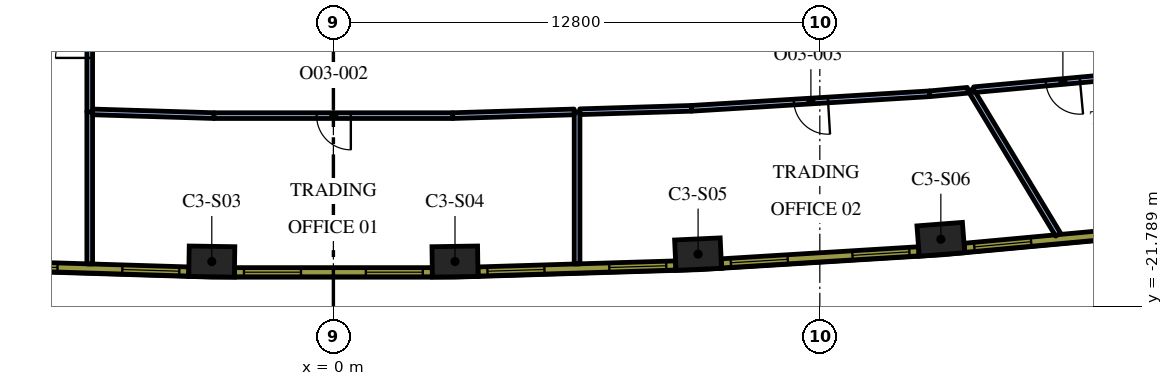
"""IFC4 building model, lengths in metres.
Left out: names, types, materials, properties, quantities, classifications, styles, units other than length and angle.
Written with IfcOpenShell. Run it as: python <this file> out.ifc"""

import sys

from ifc_helpers import new_model, si_unit, direction, frame, frame_2d, origin, origin_2d, place, context, subcontext, project, spatial, rectangle, extrude, element, fill, save


model = new_model("IFC4")
c1 = context("Model", 3, precision=1e-05, world=origin(), true_north=direction((0.0, 1.0)))
c2 = subcontext(c1, "Body", "Model", "MODEL_VIEW")
j1 = project(units=[si_unit("LENGTHUNIT", "METRE"), si_unit("PLANEANGLEUNIT", "RADIAN")], contexts=[c1])
p1 = place(None, origin())
s1 = spatial("IfcSite", under=j1, at=p1, CompositionType="ELEMENT")
p2 = place(p1, origin())
s2 = spatial("IfcBuilding", under=s1, at=p2, CompositionType="ELEMENT")
p3 = place(p2, frame((0.0, 0.0, 171.0)))
s3 = spatial("IfcBuildingStorey", under=s2, at=p3, CompositionType="ELEMENT", Elevation=171.0)
for number, where, z_axis, x_axis in (
    (1, (-3.2, -20.608, 0.0), (0.0, 0.0, 1.0), (1.0, -0.015, 0.0)),
    (2, (3.2, -20.608, 0.0), (0.0, 0.0, 1.0), (1.0, 0.015, 0.0)),
    (3, (9.597, -20.413, 0.0), (0.0, 0.0, 1.0), (0.999, 0.046, 0.0)),
    (4, (15.985, -20.022, 0.0), (0.0, 0.0, 1.0), (0.997, 0.076, 0.0)),
):
    element("IfcColumn", number, at=place(p3, frame(where, z_axis=z_axis, x_axis=x_axis)), inside=s3, PredefinedType="COLUMN", context=c2, shape_type="SweptSolid", body=[
        extrude(rectangle(XDim=1.2, YDim=0.8, at=origin_2d()), origin(), (0.0, 0.0, 1.0), 4.2),
    ])
p4 = place(p3, frame((-6.412, -16.664, 0.0), z_axis=(0.0, 0.0, 1.0), x_axis=(0.0, -1.0, 0.0)))
e5 = element("IfcWall", 5, at=p4, inside=s3, PredefinedType="PARTITIONING", context=c2, shape_type="SweptSolid", body=[
    extrude(rectangle(XDim=4.006, YDim=0.15, at=frame_2d((2.003, 0.0))), origin(), (0.0, 0.0, 1.0), 3.15),
])
p5 = place(p3, frame((-6.412, -16.672, 0.0), z_axis=(0.0, 0.0, 1.0), x_axis=(0.0, 1.0, 0.0)))
e6 = element("IfcWall", 6, at=p5, inside=s3, PredefinedType="PARTITIONING", context=c2, shape_type="SweptSolid", body=[
    extrude(rectangle(XDim=3.822, YDim=0.15, at=frame_2d((1.911, 0.0))), origin(), (0.0, 0.0, 1.0), 3.15),
])
p6 = place(p5, frame((1.422, 0.0, 0.0)))
e7 = element("IfcOpeningElement", 7, at=p6, cuts=e6, PredefinedType="OPENING", context=c2, shape_type="SweptSolid", body=[
    extrude(rectangle(XDim=0.9, YDim=2.1, at=frame_2d((0.45, 1.05))), frame((0.0, 0.085, 0.0), z_axis=(0.0, -1.0, 0.0), x_axis=(1.0, 0.0, 0.0)), (0.0, 0.0, 1.0), 0.17),
])
p7 = place(p3, frame((6.412, -16.668, 0.0), z_axis=(0.0, 0.0, 1.0), x_axis=(0.0, -1.0, 0.0)))
e8 = element("IfcWall", 8, at=p7, inside=s3, PredefinedType="PARTITIONING", context=c2, shape_type="SweptSolid", body=[
    extrude(rectangle(XDim=4.002, YDim=0.15, at=frame_2d((2.001, 0.0))), origin(), (0.0, 0.0, 1.0), 3.15),
])
p8 = place(p3, frame((-6.337, -16.671, 0.0), z_axis=(0.0, 0.0, 1.0), x_axis=(0.999533369646, -0.030545751995, 0.0)))
e9 = element("IfcWall", 9, at=p8, inside=s3, PredefinedType="PARTITIONING", context=c2, shape_type="SweptSolid", body=[
    extrude(rectangle(XDim=3.197, YDim=0.15, at=frame_2d((1.599, 0.0))), origin(), (0.0, 0.0, 1.0), 3.15),
])
p9 = place(p3, frame((3.141, -16.768, 0.0), z_axis=(0.0, 0.0, 1.0), x_axis=(-1.0, 0.0, 0.0)))
e10 = element("IfcWall", 10, at=p9, inside=s3, PredefinedType="PARTITIONING", context=c2, shape_type="SweptSolid", body=[
    extrude(rectangle(XDim=6.283, YDim=0.15, at=frame_2d((3.141, 0.0))), origin(), (0.0, 0.0, 1.0), 3.15),
])
p10 = place(p9, frame((2.683, 0.0, 0.0)))
e11 = element("IfcOpeningElement", 11, at=p10, cuts=e10, PredefinedType="OPENING", context=c2, shape_type="SweptSolid", body=[
    extrude(rectangle(XDim=0.9, YDim=2.1, at=frame_2d((0.45, 1.05))), frame((0.0, 0.085, 0.0), z_axis=(0.0, -1.0, 0.0), x_axis=(1.0, 0.0, 0.0)), (0.0, 0.0, 1.0), 0.17),
])
p11 = place(p3, frame((3.141, -16.768, 0.0), z_axis=(0.0, 0.0, 1.0), x_axis=(0.999533369646, 0.030545751995, 0.0)))
e12 = element("IfcWall", 12, at=p11, inside=s3, PredefinedType="PARTITIONING", context=c2, shape_type="SweptSolid", body=[
    extrude(rectangle(XDim=3.197, YDim=0.15, at=frame_2d((1.599, 0.0))), origin(), (0.0, 0.0, 1.0), 3.15),
])
p12 = place(p3, frame((16.773, -16.094, 0.0), z_axis=(0.0, 0.0, 1.0), x_axis=(0.516844039178, -0.856079575253, 0.0)))
e13 = element("IfcWall", 13, at=p12, inside=s3, PredefinedType="PARTITIONING", context=c2, shape_type="SweptSolid", body=[
    extrude(rectangle(XDim=4.446, YDim=0.15, at=frame_2d((2.223, 0.0))), origin(), (0.0, 0.0, 1.0), 3.15),
])
p13 = place(p3, frame((6.487, -16.666, 0.0), z_axis=(0.0, 0.0, 1.0), x_axis=(0.999533978083, 0.030525835896, 0.0)))
e14 = element("IfcWall", 14, at=p13, inside=s3, PredefinedType="PARTITIONING", context=c2, shape_type="SweptSolid", body=[
    extrude(rectangle(XDim=2.935, YDim=0.15, at=frame_2d((1.468, 0.0))), origin(), (0.0, 0.0, 1.0), 3.15),
])
p14 = place(p3, frame((15.692, -16.193, 0.0), z_axis=(0.0, 0.0, 1.0), x_axis=(-0.998137075468, -0.061011298754, 0.0)))
e15 = element("IfcWall", 15, at=p14, inside=s3, PredefinedType="PARTITIONING", context=c2, shape_type="SweptSolid", body=[
    extrude(rectangle(XDim=6.282, YDim=0.15, at=frame_2d((3.141, 0.0))), origin(), (0.0, 0.0, 1.0), 3.15),
])
p15 = place(p14, frame((2.683, 0.0, 0.0)))
e16 = element("IfcOpeningElement", 16, at=p15, cuts=e15, PredefinedType="OPENING", context=c2, shape_type="SweptSolid", body=[
    extrude(rectangle(XDim=0.9, YDim=2.1, at=frame_2d((0.45, 1.05))), frame((0.0, 0.085, 0.0), z_axis=(0.0, -1.0, 0.0), x_axis=(1.0, 0.0, 0.0)), (0.0, 0.0, 1.0), 0.17),
])
p16 = place(p3, frame((15.692, -16.193, 0.0), z_axis=(0.0, 0.0, 1.0), x_axis=(0.995818997537, 0.091348366946, 0.0)))
e17 = element("IfcWall", 17, at=p16, inside=s3, PredefinedType="PARTITIONING", context=c2, shape_type="SweptSolid", body=[
    extrude(rectangle(XDim=1.002, YDim=0.15, at=frame_2d((0.501, 0.0))), origin(), (0.0, 0.0, 1.0), 3.15),
])
p17 = place(p3, frame((21.525, -15.657, 0.0), z_axis=(0.0, 0.0, 1.0), x_axis=(-0.99581172086, -0.091427657734, 0.0)))
e18 = element("IfcWall", 18, at=p17, inside=s3, PredefinedType="PARTITIONING", context=c2, shape_type="SweptSolid", body=[
    extrude(rectangle(XDim=4.689, YDim=0.15, at=frame_2d((2.344, 0.0))), origin(), (0.0, 0.0, 1.0), 3.15),
])
p18 = place(p17, frame((1.889, 0.0, 0.0)))
e19 = element("IfcOpeningElement", 19, at=p18, cuts=e18, PredefinedType="OPENING", context=c2, shape_type="SweptSolid", body=[
    extrude(rectangle(XDim=0.9, YDim=2.1, at=frame_2d((0.45, 1.05))), frame((0.0, 0.085, 0.0), z_axis=(0.0, -1.0, 0.0), x_axis=(1.0, 0.0, 0.0)), (0.0, 0.0, 1.0), 0.17),
])
p19 = place(p3, frame((-9.007, -20.711, 0.0), z_axis=(0.0, 0.0, 1.0), x_axis=(0.999533441983, -0.030543384845, 0.0)))
e20 = element("IfcWall", 20, at=p19, inside=s3, PredefinedType="SOLIDWALL", context=c2, shape_type="SweptSolid", body=[
    extrude(rectangle(XDim=5.204, YDim=0.24, at=frame_2d((2.602, 0.0))), origin(), (0.0, 0.0, 1.0), 3.95),
])
p20 = place(p19, frame((0.248, 0.0, 0.9)))
e21 = element("IfcOpeningElement", 21, at=p20, cuts=e20, PredefinedType="OPENING", context=c2, shape_type="SweptSolid", body=[
    extrude(rectangle(XDim=1.5, YDim=2.55, at=frame_2d((0.75, 1.275))), frame((0.0, 0.13, 0.0), z_axis=(0.0, -1.0, 0.0), x_axis=(1.0, 0.0, 0.0)), (0.0, 0.0, 1.0), 0.26),
])
p21 = place(p19, frame((3.455, 0.0, 0.9)))
e22 = element("IfcOpeningElement", 22, at=p21, cuts=e20, PredefinedType="OPENING", context=c2, shape_type="SweptSolid", body=[
    extrude(rectangle(XDim=1.5, YDim=2.55, at=frame_2d((0.75, 1.275))), frame((0.0, 0.13, 0.0), z_axis=(0.0, -1.0, 0.0), x_axis=(1.0, 0.0, 0.0)), (0.0, 0.0, 1.0), 0.26),
])
p22 = place(p3, frame((-2.602, -20.888, 0.0), z_axis=(0.0, 0.0, 1.0), x_axis=(1.0, 0.0, 0.0)))
e23 = element("IfcWall", 23, at=p22, inside=s3, PredefinedType="SOLIDWALL", context=c2, shape_type="SweptSolid", body=[
    extrude(rectangle(XDim=5.204, YDim=0.24, at=frame_2d((2.602, 0.0))), origin(), (0.0, 0.0, 1.0), 3.95),
])
p23 = place(p22, frame((0.248, 0.0, 0.9)))
e24 = element("IfcOpeningElement", 24, at=p23, cuts=e23, PredefinedType="OPENING", context=c2, shape_type="SweptSolid", body=[
    extrude(rectangle(XDim=1.5, YDim=2.55, at=frame_2d((0.75, 1.275))), frame((0.0, 0.13, 0.0), z_axis=(0.0, -1.0, 0.0), x_axis=(1.0, 0.0, 0.0)), (0.0, 0.0, 1.0), 0.26),
])
p24 = place(p22, frame((3.455, 0.0, 0.9)))
e25 = element("IfcOpeningElement", 25, at=p24, cuts=e23, PredefinedType="OPENING", context=c2, shape_type="SweptSolid", body=[
    extrude(rectangle(XDim=1.5, YDim=2.55, at=frame_2d((0.75, 1.275))), frame((0.0, 0.13, 0.0), z_axis=(0.0, -1.0, 0.0), x_axis=(1.0, 0.0, 0.0)), (0.0, 0.0, 1.0), 0.26),
])
p25 = place(p3, frame((3.806, -20.87, 0.0), z_axis=(0.0, 0.0, 1.0), x_axis=(0.999533441983, 0.030543384845, 0.0)))
e26 = element("IfcWall", 26, at=p25, inside=s3, PredefinedType="SOLIDWALL", context=c2, shape_type="SweptSolid", body=[
    extrude(rectangle(XDim=5.204, YDim=0.24, at=frame_2d((2.602, 0.0))), origin(), (0.0, 0.0, 1.0), 3.95),
])
p26 = place(p25, frame((0.248, 0.0, 0.9)))
e27 = element("IfcOpeningElement", 27, at=p26, cuts=e26, PredefinedType="OPENING", context=c2, shape_type="SweptSolid", body=[
    extrude(rectangle(XDim=1.5, YDim=2.55, at=frame_2d((0.75, 1.275))), frame((0.0, 0.13, 0.0), z_axis=(0.0, -1.0, 0.0), x_axis=(1.0, 0.0, 0.0)), (0.0, 0.0, 1.0), 0.26),
])
p27 = place(p25, frame((3.455, 0.0, 0.9)))
e28 = element("IfcOpeningElement", 28, at=p27, cuts=e26, PredefinedType="OPENING", context=c2, shape_type="SweptSolid", body=[
    extrude(rectangle(XDim=1.5, YDim=2.55, at=frame_2d((0.75, 1.275))), frame((0.0, 0.13, 0.0), z_axis=(0.0, -1.0, 0.0), x_axis=(1.0, 0.0, 0.0)), (0.0, 0.0, 1.0), 0.26),
])
p28 = place(p3, frame((10.211, -20.656, 0.0), z_axis=(0.0, 0.0, 1.0), x_axis=(0.998135294646, 0.061040425794, 0.0)))
e29 = element("IfcWall", 29, at=p28, inside=s3, PredefinedType="SOLIDWALL", context=c2, shape_type="SweptSolid", body=[
    extrude(rectangle(XDim=5.204, YDim=0.24, at=frame_2d((2.602, 0.0))), origin(), (0.0, 0.0, 1.0), 3.95),
])
p29 = place(p28, frame((0.248, 0.0, 0.9)))
e30 = element("IfcOpeningElement", 30, at=p29, cuts=e29, PredefinedType="OPENING", context=c2, shape_type="SweptSolid", body=[
    extrude(rectangle(XDim=1.5, YDim=2.55, at=frame_2d((0.75, 1.275))), frame((0.0, 0.13, 0.0), z_axis=(0.0, -1.0, 0.0), x_axis=(1.0, 0.0, 0.0)), (0.0, 0.0, 1.0), 0.26),
])
p30 = place(p28, frame((3.455, 0.0, 0.9)))
e31 = element("IfcOpeningElement", 31, at=p30, cuts=e29, PredefinedType="OPENING", context=c2, shape_type="SweptSolid", body=[
    extrude(rectangle(XDim=1.5, YDim=2.55, at=frame_2d((0.75, 1.275))), frame((0.0, 0.13, 0.0), z_axis=(0.0, -1.0, 0.0), x_axis=(1.0, 0.0, 0.0)), (0.0, 0.0, 1.0), 0.26),
])
p31 = place(p3, frame((16.606, -20.247, 0.0), z_axis=(0.0, 0.0, 1.0), x_axis=(0.995808712151, 0.091460422067, 0.0)))
e32 = element("IfcWall", 32, at=p31, inside=s3, PredefinedType="SOLIDWALL", context=c2, shape_type="SweptSolid", body=[
    extrude(rectangle(XDim=5.213, YDim=0.24, at=frame_2d((2.606, 0.0))), origin(), (0.0, 0.0, 1.0), 3.95),
])
p32 = place(p31, frame((0.261, 0.0, 0.9)))
e33 = element("IfcOpeningElement", 33, at=p32, cuts=e32, PredefinedType="OPENING", context=c2, shape_type="SweptSolid", body=[
    extrude(rectangle(XDim=1.5, YDim=2.55, at=frame_2d((0.75, 1.275))), frame((0.0, 0.13, 0.0), z_axis=(0.0, -1.0, 0.0), x_axis=(1.0, 0.0, 0.0)), (0.0, 0.0, 1.0), 0.26),
])
p33 = place(p31, frame((3.492, 0.0, 0.9)))
e34 = element("IfcOpeningElement", 34, at=p33, cuts=e32, PredefinedType="OPENING", context=c2, shape_type="SweptSolid", body=[
    extrude(rectangle(XDim=1.5, YDim=2.55, at=frame_2d((0.75, 1.275))), frame((0.0, 0.13, 0.0), z_axis=(0.0, -1.0, 0.0), x_axis=(1.0, 0.0, 0.0)), (0.0, 0.0, 1.0), 0.26),
])
p34 = place(p6, origin())
e35 = element("IfcDoor", 35, at=p34, inside=s3, OperationType="SINGLE_SWING_LEFT", PredefinedType="DOOR", context=c2, shape_type="SweptSolid", body=[
    extrude(rectangle(XDim=0.9, YDim=2.1, at=frame_2d((0.45, 1.05))), frame((0.0, 0.025, 0.0), z_axis=(0.0, -1.0, 0.0), x_axis=(1.0, 0.0, 0.0)), (0.0, 0.0, 1.0), 0.05),
])
fill(e7, e35)
p35 = place(p10, origin())
e36 = element("IfcDoor", 36, at=p35, inside=s3, OperationType="SINGLE_SWING_LEFT", PredefinedType="DOOR", context=c2, shape_type="SweptSolid", body=[
    extrude(rectangle(XDim=0.9, YDim=2.1, at=frame_2d((0.45, 1.05))), frame((0.0, 0.025, 0.0), z_axis=(0.0, -1.0, 0.0), x_axis=(1.0, 0.0, 0.0)), (0.0, 0.0, 1.0), 0.05),
])
fill(e11, e36)
p36 = place(p15, origin())
e37 = element("IfcDoor", 37, at=p36, inside=s3, OperationType="SINGLE_SWING_LEFT", PredefinedType="DOOR", context=c2, shape_type="SweptSolid", body=[
    extrude(rectangle(XDim=0.9, YDim=2.1, at=frame_2d((0.45, 1.05))), frame((0.0, 0.025, 0.0), z_axis=(0.0, -1.0, 0.0), x_axis=(1.0, 0.0, 0.0)), (0.0, 0.0, 1.0), 0.05),
])
fill(e16, e37)
p37 = place(p18, origin())
e38 = element("IfcDoor", 38, at=p37, inside=s3, OperationType="SINGLE_SWING_LEFT", PredefinedType="DOOR", context=c2, shape_type="SweptSolid", body=[
    extrude(rectangle(XDim=0.9, YDim=2.1, at=frame_2d((0.45, 1.05))), frame((0.0, 0.025, 0.0), z_axis=(0.0, -1.0, 0.0), x_axis=(1.0, 0.0, 0.0)), (0.0, 0.0, 1.0), 0.05),
])
fill(e19, e38)
p38 = place(p20, origin())
e39 = element("IfcWindow", 39, at=p38, inside=s3, PartitioningType="SINGLE_PANEL", PredefinedType="WINDOW", context=c2, shape_type="SweptSolid", body=[
    extrude(rectangle(XDim=1.5, YDim=2.55, at=frame_2d((0.75, 1.275))), frame((0.0, 0.04, 0.0), z_axis=(0.0, -1.0, 0.0), x_axis=(1.0, 0.0, 0.0)), (0.0, 0.0, 1.0), 0.06),
])
fill(e21, e39)
p39 = place(p21, origin())
e40 = element("IfcWindow", 40, at=p39, inside=s3, PartitioningType="SINGLE_PANEL", PredefinedType="WINDOW", context=c2, shape_type="SweptSolid", body=[
    extrude(rectangle(XDim=1.5, YDim=2.55, at=frame_2d((0.75, 1.275))), frame((0.0, 0.04, 0.0), z_axis=(0.0, -1.0, 0.0), x_axis=(1.0, 0.0, 0.0)), (0.0, 0.0, 1.0), 0.06),
])
fill(e22, e40)
p40 = place(p23, origin())
e41 = element("IfcWindow", 41, at=p40, inside=s3, PartitioningType="SINGLE_PANEL", PredefinedType="WINDOW", context=c2, shape_type="SweptSolid", body=[
    extrude(rectangle(XDim=1.5, YDim=2.55, at=frame_2d((0.75, 1.275))), frame((0.0, 0.04, 0.0), z_axis=(0.0, -1.0, 0.0), x_axis=(1.0, 0.0, 0.0)), (0.0, 0.0, 1.0), 0.06),
])
fill(e24, e41)
p41 = place(p24, origin())
e42 = element("IfcWindow", 42, at=p41, inside=s3, PartitioningType="SINGLE_PANEL", PredefinedType="WINDOW", context=c2, shape_type="SweptSolid", body=[
    extrude(rectangle(XDim=1.5, YDim=2.55, at=frame_2d((0.75, 1.275))), frame((0.0, 0.04, 0.0), z_axis=(0.0, -1.0, 0.0), x_axis=(1.0, 0.0, 0.0)), (0.0, 0.0, 1.0), 0.06),
])
fill(e25, e42)
p42 = place(p26, origin())
e43 = element("IfcWindow", 43, at=p42, inside=s3, PartitioningType="SINGLE_PANEL", PredefinedType="WINDOW", context=c2, shape_type="SweptSolid", body=[
    extrude(rectangle(XDim=1.5, YDim=2.55, at=frame_2d((0.75, 1.275))), frame((0.0, 0.04, 0.0), z_axis=(0.0, -1.0, 0.0), x_axis=(1.0, 0.0, 0.0)), (0.0, 0.0, 1.0), 0.06),
])
fill(e27, e43)
p43 = place(p27, origin())
e44 = element("IfcWindow", 44, at=p43, inside=s3, PartitioningType="SINGLE_PANEL", PredefinedType="WINDOW", context=c2, shape_type="SweptSolid", body=[
    extrude(rectangle(XDim=1.5, YDim=2.55, at=frame_2d((0.75, 1.275))), frame((0.0, 0.04, 0.0), z_axis=(0.0, -1.0, 0.0), x_axis=(1.0, 0.0, 0.0)), (0.0, 0.0, 1.0), 0.06),
])
fill(e28, e44)
p44 = place(p29, origin())
e45 = element("IfcWindow", 45, at=p44, inside=s3, PartitioningType="SINGLE_PANEL", PredefinedType="WINDOW", context=c2, shape_type="SweptSolid", body=[
    extrude(rectangle(XDim=1.5, YDim=2.55, at=frame_2d((0.75, 1.275))), frame((0.0, 0.04, 0.0), z_axis=(0.0, -1.0, 0.0), x_axis=(1.0, 0.0, 0.0)), (0.0, 0.0, 1.0), 0.06),
])
fill(e30, e45)
p45 = place(p30, origin())
e46 = element("IfcWindow", 46, at=p45, inside=s3, PartitioningType="SINGLE_PANEL", PredefinedType="WINDOW", context=c2, shape_type="SweptSolid", body=[
    extrude(rectangle(XDim=1.5, YDim=2.55, at=frame_2d((0.75, 1.275))), frame((0.0, 0.04, 0.0), z_axis=(0.0, -1.0, 0.0), x_axis=(1.0, 0.0, 0.0)), (0.0, 0.0, 1.0), 0.06),
])
fill(e31, e46)
p46 = place(p32, origin())
e47 = element("IfcWindow", 47, at=p46, inside=s3, PartitioningType="SINGLE_PANEL", PredefinedType="WINDOW", context=c2, shape_type="SweptSolid", body=[
    extrude(rectangle(XDim=1.5, YDim=2.55, at=frame_2d((0.75, 1.275))), frame((0.0, 0.04, 0.0), z_axis=(0.0, -1.0, 0.0), x_axis=(1.0, 0.0, 0.0)), (0.0, 0.0, 1.0), 0.06),
])
fill(e33, e47)
save(model, sys.argv[1])
